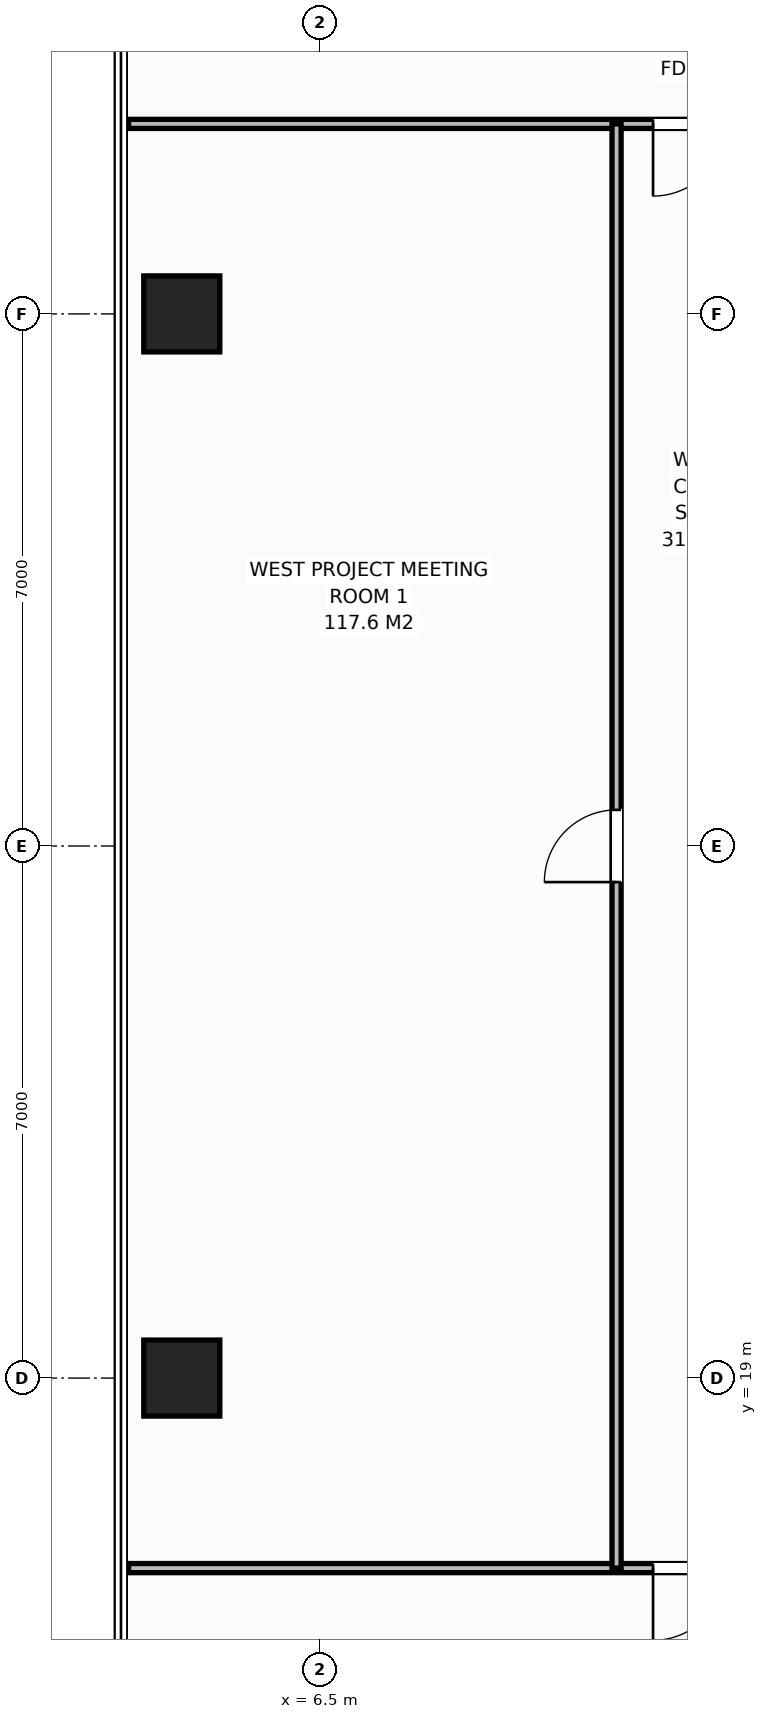
"""IFC4 building model, lengths in metres.
Left out: names, types, materials, properties, quantities, classifications, styles, units other than length and angle.
Written with IfcOpenShell. Run it as: python <this file> out.ifc"""

import sys

from ifc_helpers import new_model, si_unit, direction, frame, frame_2d, origin, origin_2d, place, context, subcontext, project, spatial, rectangle, extrude, element, fill, save


model = new_model("IFC4")
c1 = context("Model", 3, precision=1e-05, world=origin(), true_north=direction((0.0, 1.0)))
c2 = subcontext(c1, "Body", "Model", "MODEL_VIEW")
j1 = project(units=[si_unit("LENGTHUNIT", "METRE"), si_unit("PLANEANGLEUNIT", "RADIAN")], contexts=[c1])
p1 = place(None, origin())
s1 = spatial("IfcSite", under=j1, at=p1, CompositionType="ELEMENT")
p2 = place(p1, origin())
s2 = spatial("IfcBuilding", under=s1, at=p2, CompositionType="ELEMENT")
p3 = place(p2, frame((0.0, 0.0, 163.2)))
s3 = spatial("IfcBuildingStorey", under=s2, at=p3, CompositionType="ELEMENT", Elevation=163.2)
for number, where, z_axis, x_axis in (
    (1, (4.68, 19.0, 0.0), (0.0, 0.0, 1.0), (1.0, 0.0, 0.0)),
    (2, (4.68, 33.0, 0.0), (0.0, 0.0, 1.0), (1.0, 0.0, 0.0)),
):
    element("IfcColumn", number, at=place(p3, frame(where, z_axis=z_axis, x_axis=x_axis)), inside=s3, PredefinedType="COLUMN", context=c2, shape_type="SweptSolid", body=[
        extrude(rectangle(XDim=1.0, YDim=1.0, at=origin_2d()), origin(), (0.0, 0.0, 1.0), 3.8),
    ])
p4 = place(p3, frame((3.98, 35.5, 0.0), z_axis=(0.0, 0.0, 1.0), x_axis=(1.0, 0.0, 0.0)))
e3 = element("IfcWall", 3, at=p4, inside=s3, PredefinedType="PARTITIONING", context=c2, shape_type="SweptSolid", body=[
    extrude(rectangle(XDim=11.215, YDim=0.12, at=frame_2d((5.607, 0.0))), origin(), (0.0, 0.0, 1.0), 3.572),
])
p5 = place(p4, frame((6.9, 0.0, 0.0)))
e4 = element("IfcOpeningElement", 4, at=p5, cuts=e3, PredefinedType="OPENING", context=c2, shape_type="SweptSolid", body=[
    extrude(rectangle(XDim=0.95, YDim=2.15, at=frame_2d((0.475, 1.075))), frame((0.0, 0.07, 0.0), z_axis=(0.0, -1.0, 0.0), x_axis=(1.0, 0.0, 0.0)), (0.0, 0.0, 1.0), 0.14),
])
p6 = place(p3, frame((3.98, 16.5, 0.0), z_axis=(0.0, 0.0, 1.0), x_axis=(1.0, 0.0, 0.0)))
e5 = element("IfcWall", 5, at=p6, inside=s3, PredefinedType="PARTITIONING", context=c2, shape_type="SweptSolid", body=[
    extrude(rectangle(XDim=10.32, YDim=0.12, at=frame_2d((5.16, 0.0))), origin(), (0.0, 0.0, 1.0), 3.572),
])
p7 = place(p6, frame((6.9, 0.0, 0.0)))
e6 = element("IfcOpeningElement", 6, at=p7, cuts=e5, PredefinedType="OPENING", context=c2, shape_type="SweptSolid", body=[
    extrude(rectangle(XDim=0.95, YDim=2.15, at=frame_2d((0.475, 1.075))), frame((0.0, 0.07, 0.0), z_axis=(0.0, -1.0, 0.0), x_axis=(1.0, 0.0, 0.0)), (0.0, 0.0, 1.0), 0.14),
])
p8 = place(p3, frame((10.4, 16.5, 0.0), z_axis=(0.0, 0.0, 1.0), x_axis=(0.0, 1.0, 0.0)))
e7 = element("IfcWall", 7, at=p8, inside=s3, PredefinedType="PARTITIONING", context=c2, shape_type="SweptSolid", body=[
    extrude(rectangle(XDim=19.0, YDim=0.12, at=frame_2d((9.5, 0.0))), origin(), (0.0, 0.0, 1.0), 3.572),
])
p9 = place(p8, frame((9.025, 0.0, 0.0)))
e8 = element("IfcOpeningElement", 8, at=p9, cuts=e7, PredefinedType="OPENING", context=c2, shape_type="SweptSolid", body=[
    extrude(rectangle(XDim=0.95, YDim=2.15, at=frame_2d((0.475, 1.075))), frame((0.0, 0.07, 0.0), z_axis=(0.0, -1.0, 0.0), x_axis=(1.0, 0.0, 0.0)), (0.0, 0.0, 1.0), 0.14),
])
p10 = place(p5, origin())
e9 = element("IfcDoor", 9, at=p10, inside=s3, OperationType="SINGLE_SWING_RIGHT", PredefinedType="DOOR", context=c2, shape_type="SweptSolid", body=[
    extrude(rectangle(XDim=0.95, YDim=2.15, at=frame_2d((0.475, 1.075))), frame((0.0, 0.025, 0.0), z_axis=(0.0, -1.0, 0.0), x_axis=(1.0, 0.0, 0.0)), (0.0, 0.0, 1.0), 0.05),
])
fill(e4, e9)
p11 = place(p7, origin())
e10 = element("IfcDoor", 10, at=p11, inside=s3, OperationType="SINGLE_SWING_RIGHT", PredefinedType="DOOR", context=c2, shape_type="SweptSolid", body=[
    extrude(rectangle(XDim=0.95, YDim=2.15, at=frame_2d((0.475, 1.075))), frame((0.0, 0.025, 0.0), z_axis=(0.0, -1.0, 0.0), x_axis=(1.0, 0.0, 0.0)), (0.0, 0.0, 1.0), 0.05),
])
fill(e6, e10)
p12 = place(p9, origin())
e11 = element("IfcDoor", 11, at=p12, inside=s3, OperationType="SINGLE_SWING_LEFT", PredefinedType="DOOR", context=c2, shape_type="SweptSolid", body=[
    extrude(rectangle(XDim=0.95, YDim=2.15, at=frame_2d((0.475, 1.075))), frame((0.0, 0.025, 0.0), z_axis=(0.0, -1.0, 0.0), x_axis=(1.0, 0.0, 0.0)), (0.0, 0.0, 1.0), 0.05),
])
fill(e8, e11)
save(model, sys.argv[1])
